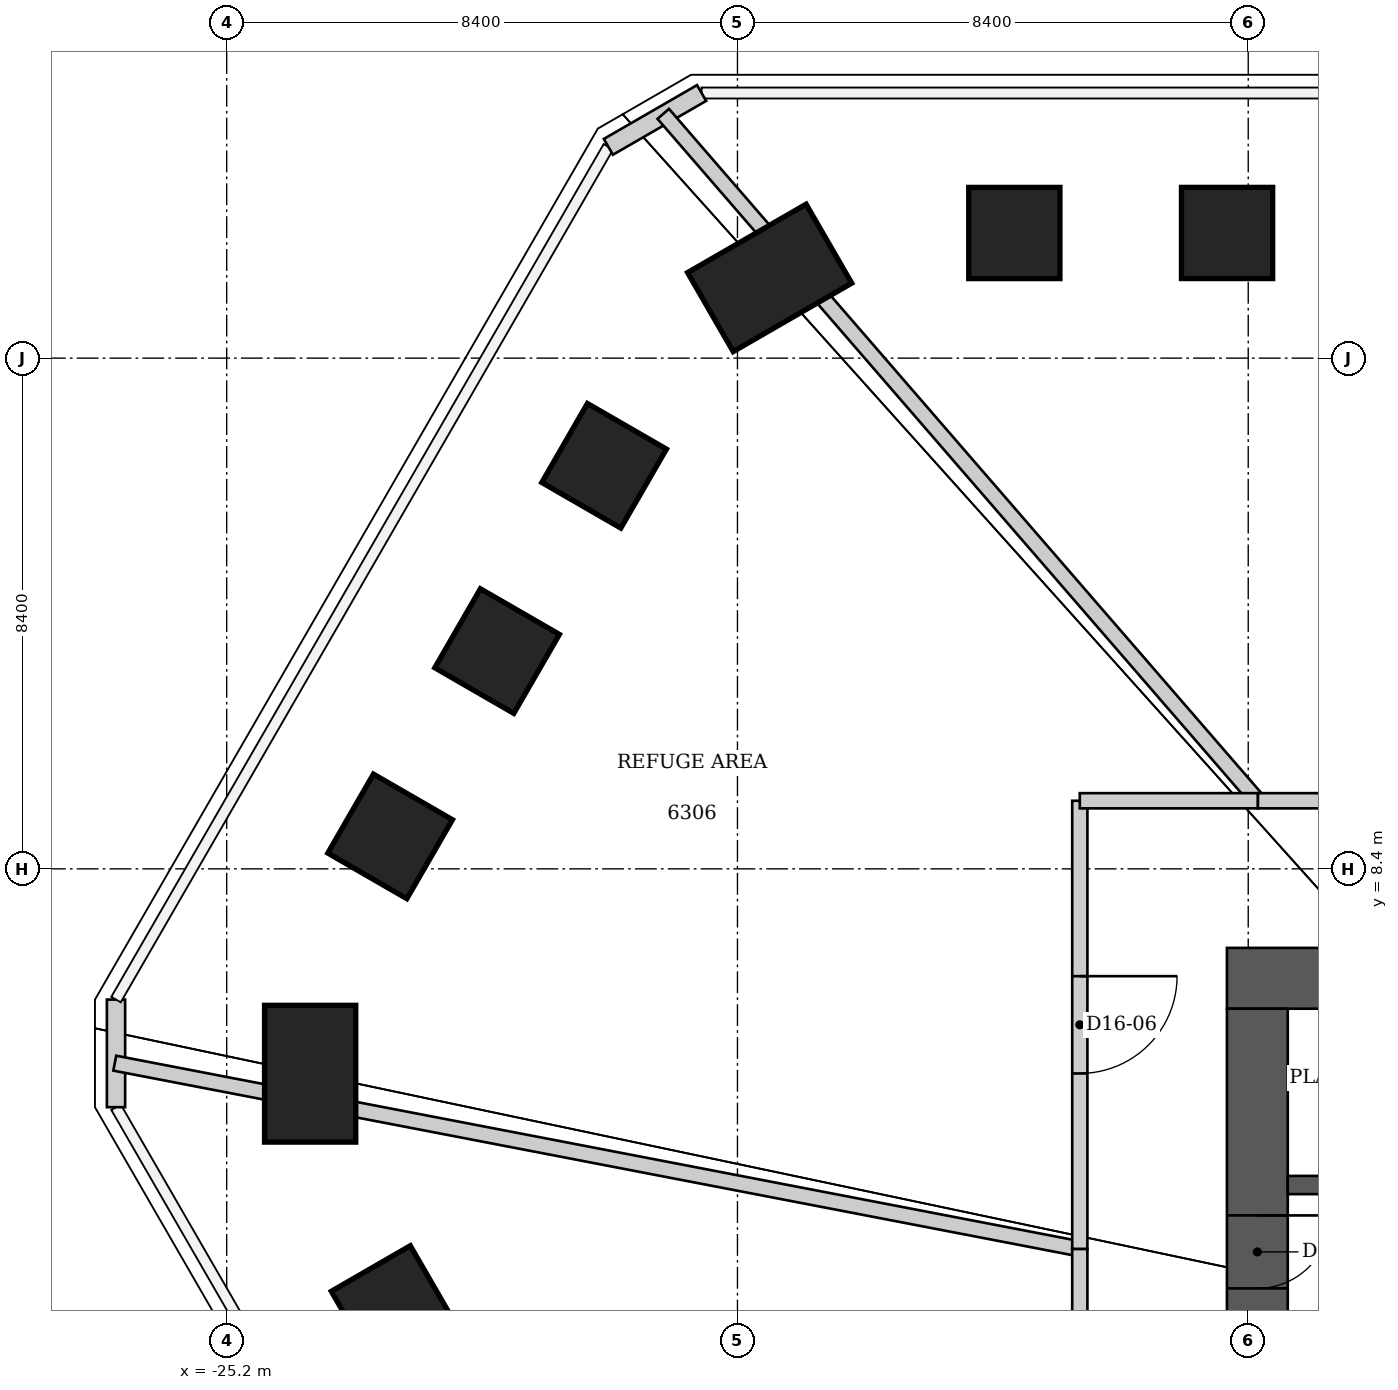
"""IFC4 building model, lengths in metres.
Left out: names, types, materials, properties, quantities, classifications, styles, units other than length and angle.
Written with IfcOpenShell. Run it as: python <this file> out.ifc"""

import sys

from ifc_helpers import new_model, si_unit, direction, frame, frame_2d, origin, origin_2d, place, context, subcontext, project, spatial, rectangle, extrude, element, fill, save


model = new_model("IFC4")
c1 = context("Model", 3, precision=1e-05, world=origin(), true_north=direction((0.0, 1.0)))
c2 = subcontext(c1, "Body", "Model", "MODEL_VIEW")
j1 = project(units=[si_unit("LENGTHUNIT", "METRE"), si_unit("PLANEANGLEUNIT", "RADIAN")], contexts=[c1])
p1 = place(None, origin())
s1 = spatial("IfcSite", under=j1, at=p1, CompositionType="ELEMENT")
p2 = place(p1, origin())
s2 = spatial("IfcBuilding", under=s1, at=p2, CompositionType="ELEMENT")
p3 = place(p2, frame((0.0, 0.0, 251.6)))
s3 = spatial("IfcBuildingStorey", under=s2, at=p3, CompositionType="ELEMENT", Elevation=251.6)
p4 = place(p3, frame((-12.247, 18.858, 0.0), z_axis=(0.035406986741, -0.054549602798, 0.997883102435), x_axis=(0.00218109941, 0.998511031505, 0.054506538759)))
e1 = element("IfcColumn", 1, at=p4, inside=s3, PredefinedType="COLUMN", context=c2, shape_type="SweptSolid", body=[
    extrude(rectangle(XDim=1.5, YDim=1.5, at=origin_2d()), origin(), (0.0, 0.0, 1.0), 5.344),
])
p5 = place(p3, frame((-8.748, 18.858, 0.0), z_axis=(0.025327774033, -0.054580212151, 0.998188110681), x_axis=(0.001244888644, 0.998509379529, 0.05456619141)))
e2 = element("IfcColumn", 2, at=p5, inside=s3, PredefinedType="COLUMN", context=c2, shape_type="SweptSolid", body=[
    extrude(rectangle(XDim=1.5, YDim=1.5, at=origin_2d()), origin(), (0.0, 0.0, 1.0), 5.35),
])
p6 = place(p3, frame((-22.455, 1.177, 0.0), z_axis=(0.064920517945, -0.003426487576, 0.997884555213), x_axis=(-0.863948256114, -0.500624095241, 0.054487852065)))
e3 = element("IfcColumn", 3, at=p6, inside=s3, PredefinedType="COLUMN", context=c2, shape_type="SweptSolid", body=[
    extrude(rectangle(XDim=1.5, YDim=1.5, at=origin_2d()), origin(), (0.0, 0.0, 1.0), 5.344),
])
p7 = place(p3, frame((-23.827, 5.031, 0.0), z_axis=(0.069522066856, -0.014662669817, 0.997472650419), x_axis=(-0.99758039044, -0.001238756614, 0.069511366643)))
e4 = element("IfcColumn", 4, at=p7, inside=s3, PredefinedType="COLUMN", context=c2, shape_type="SweptSolid", body=[
    extrude(rectangle(XDim=1.5, YDim=2.25, at=origin_2d()), origin(), (0.0, 0.0, 1.0), 5.345),
])
p8 = place(p3, frame((-22.512, 8.934, 0.0), z_axis=(0.064067070627, -0.025398831558, 0.997622328247), x_axis=(-0.863841338514, 0.49912843617, 0.068183180344)))
e5 = element("IfcColumn", 5, at=p8, inside=s3, PredefinedType="COLUMN", context=c2, shape_type="SweptSolid", body=[
    extrude(rectangle(XDim=1.5, YDim=1.5, at=origin_2d()), origin(), (0.0, 0.0, 1.0), 5.354),
])
p9 = place(p3, frame((-20.753, 11.982, 0.0), z_axis=(0.05901628324, -0.034061867179, 0.997675732649), x_axis=(-0.864083526647, 0.498714874948, 0.068140534803)))
e6 = element("IfcColumn", 6, at=p9, inside=s3, PredefinedType="COLUMN", context=c2, shape_type="SweptSolid", body=[
    extrude(rectangle(XDim=1.5, YDim=1.5, at=origin_2d()), origin(), (0.0, 0.0, 1.0), 5.361),
])
p10 = place(p3, frame((-18.993, 15.029, 0.0), z_axis=(0.054035227668, -0.042772188652, 0.997622540868), x_axis=(-0.864272798204, 0.498381379505, 0.068180135289)))
e7 = element("IfcColumn", 7, at=p10, inside=s3, PredefinedType="COLUMN", context=c2, shape_type="SweptSolid", body=[
    extrude(rectangle(XDim=1.5, YDim=1.5, at=origin_2d()), origin(), (0.0, 0.0, 1.0), 5.354),
])
p11 = place(p3, frame((-16.271, 18.12, 0.0), z_axis=(0.047505072471, -0.052895071078, 0.997469488027), x_axis=(-0.497979226765, 0.864395060931, 0.069554786665)))
e8 = element("IfcColumn", 8, at=p11, inside=s3, PredefinedType="COLUMN", context=c2, shape_type="SweptSolid", body=[
    extrude(rectangle(XDim=1.5, YDim=2.25, at=origin_2d()), origin(), (0.0, 0.0, 1.0), 5.345),
])
p12 = place(p3, frame((-8.75, 6.6, 0.0), z_axis=(0.0, 0.0, 1.0), x_axis=(1.0, 0.0, 0.0)))
e9 = element("IfcWall", 9, at=p12, inside=s3, PredefinedType="SHEAR", context=c2, shape_type="SweptSolid", body=[
    extrude(rectangle(XDim=17.5, YDim=1.0, at=frame_2d((8.75, 0.0))), origin(), (0.0, 0.0, 1.0), 5.4),
])
p13 = place(p3, frame((-8.25, -6.1, 0.0), z_axis=(0.0, 0.0, 1.0), x_axis=(0.0, 1.0, 0.0)))
e10 = element("IfcWall", 10, at=p13, inside=s3, PredefinedType="SHEAR", context=c2, shape_type="SweptSolid", body=[
    extrude(rectangle(XDim=12.2, YDim=1.0, at=frame_2d((6.1, 0.0))), origin(), (0.0, 0.0, 1.0), 5.4),
])
p14 = place(p13, frame((7.6, 0.0, 0.0)))
e11 = element("IfcOpeningElement", 11, at=p14, cuts=e10, PredefinedType="OPENING", context=c2, shape_type="SweptSolid", body=[
    extrude(rectangle(XDim=1.2, YDim=2.2, at=frame_2d((0.6, 1.1))), frame((0.0, 0.5, 0.0), z_axis=(0.0, -1.0, 0.0), x_axis=(1.0, 0.0, 0.0)), (0.0, 0.0, 1.0), 1.0),
])
p15 = place(p3, frame((-7.75, 3.2, 0.0), z_axis=(0.0, 0.0, 1.0), x_axis=(1.0, 0.0, 0.0)))
e12 = element("IfcWall", 12, at=p15, inside=s3, PredefinedType="SHEAR", context=c2, shape_type="SweptSolid", body=[
    extrude(rectangle(XDim=15.5, YDim=0.3, at=frame_2d((7.75, 0.0))), origin(), (0.0, 0.0, 1.0), 5.4),
])
p16 = place(p15, frame((0.637, 0.0, 0.0)))
e13 = element("IfcOpeningElement", 13, at=p16, cuts=e12, PredefinedType="OPENING", context=c2, shape_type="SweptSolid", body=[
    extrude(rectangle(XDim=1.1, YDim=2.2, at=frame_2d((0.55, 1.1))), frame((0.0, 0.15, 0.0), z_axis=(0.0, -1.0, 0.0), x_axis=(1.0, 0.0, 0.0)), (0.0, 0.0, 1.0), 0.3),
])
p17 = place(p15, frame((3.262, 0.0, 0.0)))
e14 = element("IfcOpeningElement", 14, at=p17, cuts=e12, PredefinedType="OPENING", context=c2, shape_type="SweptSolid", body=[
    extrude(rectangle(XDim=1.1, YDim=2.2, at=frame_2d((0.55, 1.1))), frame((0.0, 0.15, 0.0), z_axis=(0.0, -1.0, 0.0), x_axis=(1.0, 0.0, 0.0)), (0.0, 0.0, 1.0), 0.3),
])
for number, where, z_axis, x_axis in (
    (15, (-27.02, 4.48, 0.0), (0.0, 0.0, 1.0), (0.0, 1.0, 0.0)),
    (16, (-18.923, 20.275, 0.0), (0.0, 0.0, 1.0), (0.866, 0.5, 0.0)),
):
    element("IfcWall", number, at=place(p3, frame(where, z_axis=z_axis, x_axis=x_axis)), inside=s3, PredefinedType="SOLIDWALL", context=c2, shape_type="SweptSolid", body=[
        extrude(rectangle(XDim=1.77, YDim=0.3, at=frame_2d((0.885, 0.0))), origin(), (0.0, 0.0, 1.0), 5.24),
    ])
p18 = place(p3, frame((-27.041, 5.204, 0.0), z_axis=(0.0, 0.0, 1.0), x_axis=(0.98197885356, -0.188990822953, 0.0)))
e17 = element("IfcWall", 17, at=p18, inside=s3, PredefinedType="PARTITIONING", context=c2, shape_type="SweptSolid", body=[
    extrude(rectangle(XDim=16.162, YDim=0.25, at=frame_2d((8.081, 0.0))), origin(), (0.0, 0.0, 1.0), 4.313),
])
p19 = place(p3, frame((-11.17, 2.15, 0.0), z_axis=(0.0, 0.0, 1.0), x_axis=(0.0, -1.0, 0.0)))
e18 = element("IfcWall", 18, at=p19, inside=s3, PredefinedType="PARTITIONING", context=c2, shape_type="SweptSolid", body=[
    extrude(rectangle(XDim=11.67, YDim=0.25, at=frame_2d((5.835, 0.0))), origin(), (0.0, 0.0, 1.0), 5.24),
])
p20 = place(p19, frame((5.035, 0.0, 0.0)))
e19 = element("IfcOpeningElement", 19, at=p20, cuts=e18, PredefinedType="OPENING", context=c2, shape_type="SweptSolid", body=[
    extrude(rectangle(XDim=1.6, YDim=2.4, at=frame_2d((0.8, 1.2))), frame((0.0, 0.125, 0.0), z_axis=(0.0, -1.0, 0.0), x_axis=(1.0, 0.0, 0.0)), (0.0, 0.0, 1.0), 0.25),
])
p21 = place(p3, frame((-11.17, 9.52, 0.0), z_axis=(0.0, 0.0, 1.0), x_axis=(0.0, -1.0, 0.0)))
e20 = element("IfcWall", 20, at=p21, inside=s3, PredefinedType="PARTITIONING", context=c2, shape_type="SweptSolid", body=[
    extrude(rectangle(XDim=7.37, YDim=0.25, at=frame_2d((3.685, 0.0))), origin(), (0.0, 0.0, 1.0), 5.24),
])
p22 = place(p21, frame((2.885, 0.0, 0.0)))
e21 = element("IfcOpeningElement", 21, at=p22, cuts=e20, PredefinedType="OPENING", context=c2, shape_type="SweptSolid", body=[
    extrude(rectangle(XDim=1.6, YDim=2.4, at=frame_2d((0.8, 1.2))), frame((0.0, 0.125, 0.0), z_axis=(0.0, -1.0, 0.0), x_axis=(1.0, 0.0, 0.0)), (0.0, 0.0, 1.0), 0.25),
])
p23 = place(p3, frame((-8.24, 9.52, 0.0), z_axis=(0.0, 0.0, 1.0), x_axis=(-0.654518662261, 0.756045845668, 0.0)))
e22 = element("IfcWall", 22, at=p23, inside=s3, PredefinedType="PARTITIONING", context=c2, shape_type="SweptSolid", body=[
    extrude(rectangle(XDim=14.943, YDim=0.25, at=frame_2d((7.471, 0.0))), origin(), (0.0, 0.0, 1.0), 5.2),
])
p24 = place(p3, frame((-8.24, 9.52, 0.0), z_axis=(0.0, 0.0, 1.0), x_axis=(-1.0, 0.0, 0.0)))
e23 = element("IfcWall", 23, at=p24, inside=s3, PredefinedType="PARTITIONING", context=c2, shape_type="SweptSolid", body=[
    extrude(rectangle(XDim=2.93, YDim=0.25, at=frame_2d((1.465, 0.0))), origin(), (0.0, 0.0, 1.0), 5.24),
])
p25 = place(p3, frame((8.24, 9.52, 0.0), z_axis=(0.0, 0.0, 1.0), x_axis=(-1.0, 0.0, 0.0)))
e24 = element("IfcWall", 24, at=p25, inside=s3, PredefinedType="PARTITIONING", context=c2, shape_type="SweptSolid", body=[
    extrude(rectangle(XDim=16.48, YDim=0.25, at=frame_2d((8.24, 0.0))), origin(), (0.0, 0.0, 1.0), 5.24),
])
p26 = place(p25, frame((7.44, 0.0, 0.0)))
e25 = element("IfcOpeningElement", 25, at=p26, cuts=e24, PredefinedType="OPENING", context=c2, shape_type="SweptSolid", body=[
    extrude(rectangle(XDim=1.6, YDim=2.4, at=frame_2d((0.8, 1.2))), frame((0.0, 0.125, 0.0), z_axis=(0.0, -1.0, 0.0), x_axis=(1.0, 0.0, 0.0)), (0.0, 0.0, 1.0), 0.25),
])
p27 = place(p22, origin())
e26 = element("IfcDoor", 26, at=p27, inside=s3, OperationType="DOUBLE_DOOR_SINGLE_SWING", PredefinedType="DOOR", context=c2, shape_type="SweptSolid", body=[
    extrude(rectangle(XDim=1.6, YDim=2.4, at=frame_2d((0.8, 1.2))), frame((0.0, 0.025, 0.0), z_axis=(0.0, -1.0, 0.0), x_axis=(1.0, 0.0, 0.0)), (0.0, 0.0, 1.0), 0.05),
])
fill(e21, e26)
p28 = place(p14, origin())
e27 = element("IfcDoor", 27, at=p28, inside=s3, OperationType="SINGLE_SWING_RIGHT", PredefinedType="DOOR", context=c2, shape_type="SweptSolid", body=[
    extrude(rectangle(XDim=1.2, YDim=2.2, at=frame_2d((0.6, 1.1))), frame((0.0, 0.025, 0.0), z_axis=(0.0, -1.0, 0.0), x_axis=(1.0, 0.0, 0.0)), (0.0, 0.0, 1.0), 0.05),
])
fill(e11, e27)
save(model, sys.argv[1])
